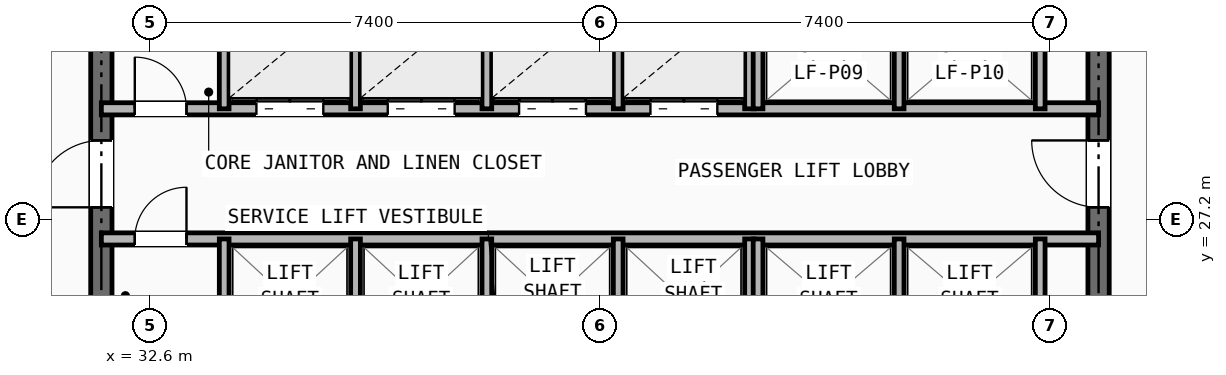
"""IFC4 building model, lengths in metres.
Left out: names, types, materials, properties, quantities, classifications, styles, units other than length and angle.
Written with IfcOpenShell. Run it as: python <this file> out.ifc"""

import sys

from ifc_helpers import new_model, si_unit, direction, frame, frame_2d, origin, place, context, subcontext, project, spatial, rectangle, extrude, element, fill, save


model = new_model("IFC4")
c1 = context("Model", 3, precision=1e-05, world=origin(), true_north=direction((0.0, 1.0)))
c2 = subcontext(c1, "Body", "Model", "MODEL_VIEW")
j1 = project(units=[si_unit("LENGTHUNIT", "METRE"), si_unit("PLANEANGLEUNIT", "RADIAN")], contexts=[c1])
p1 = place(None, origin())
s1 = spatial("IfcSite", under=j1, at=p1, CompositionType="ELEMENT")
p2 = place(p1, origin())
s2 = spatial("IfcBuilding", under=s1, at=p2, CompositionType="ELEMENT")
p3 = place(p2, frame((0.0, 0.0, 83.0)))
s3 = spatial("IfcBuildingStorey", under=s2, at=p3, CompositionType="ELEMENT", Elevation=83.0)
p4 = place(p3, frame((31.8, 16.4, 0.0), z_axis=(0.0, 0.0, 1.0), x_axis=(0.0, 1.0, 0.0)))
e1 = element("IfcWall", 1, at=p4, inside=s3, PredefinedType="SHEAR", context=c2, shape_type="SweptSolid", body=[
    extrude(rectangle(XDim=14.8, YDim=0.35, at=frame_2d((7.4, 0.0))), origin(), (0.0, 0.0, 1.0), 2.97),
])
p5 = place(p4, frame((11.0, 0.0, 0.0)))
e2 = element("IfcOpeningElement", 2, at=p5, cuts=e1, PredefinedType="OPENING", context=c2, shape_type="SweptSolid", body=[
    extrude(rectangle(XDim=1.1, YDim=2.15, at=frame_2d((0.55, 1.075))), frame((0.0, 0.185, 0.0), z_axis=(0.0, -1.0, 0.0), x_axis=(1.0, 0.0, 0.0)), (0.0, 0.0, 1.0), 0.37),
])
p6 = place(p3, frame((48.2, 16.4, 0.0), z_axis=(0.0, 0.0, 1.0), x_axis=(0.0, 1.0, 0.0)))
e3 = element("IfcWall", 3, at=p6, inside=s3, PredefinedType="SHEAR", context=c2, shape_type="SweptSolid", body=[
    extrude(rectangle(XDim=14.8, YDim=0.35, at=frame_2d((7.4, 0.0))), origin(), (0.0, 0.0, 1.0), 2.97),
])
p7 = place(p6, frame((11.0, 0.0, 0.0)))
e4 = element("IfcOpeningElement", 4, at=p7, cuts=e3, PredefinedType="OPENING", context=c2, shape_type="SweptSolid", body=[
    extrude(rectangle(XDim=1.1, YDim=2.15, at=frame_2d((0.55, 1.075))), frame((0.0, 0.185, 0.0), z_axis=(0.0, -1.0, 0.0), x_axis=(1.0, 0.0, 0.0)), (0.0, 0.0, 1.0), 0.37),
])
p8 = place(p3, frame((31.8, 29.02, 0.0), z_axis=(0.0, 0.0, 1.0), x_axis=(1.0, 0.0, 0.0)))
e5 = element("IfcWall", 5, at=p8, inside=s3, PredefinedType="SOLIDWALL", context=c2, shape_type="SweptSolid", body=[
    extrude(rectangle(XDim=16.4, YDim=0.2, at=frame_2d((8.2, 0.0))), origin(), (0.0, 0.0, 1.0), 2.421),
])
p9 = place(p8, frame((0.55, 0.0, 0.0)))
e6 = element("IfcOpeningElement", 6, at=p9, cuts=e5, PredefinedType="OPENING", context=c2, shape_type="SweptSolid", body=[
    extrude(rectangle(XDim=0.85, YDim=2.05, at=frame_2d((0.425, 1.025))), frame((0.0, 0.11, 0.0), z_axis=(0.0, -1.0, 0.0), x_axis=(1.0, 0.0, 0.0)), (0.0, 0.0, 1.0), 0.22),
])
p10 = place(p8, frame((2.55, 0.0, 0.0)))
e7 = element("IfcOpeningElement", 7, at=p10, cuts=e5, PredefinedType="OPENING", context=c2, shape_type="SweptSolid", body=[
    extrude(rectangle(XDim=1.1, YDim=2.15, at=frame_2d((0.55, 1.075))), frame((0.0, 0.11, 0.0), z_axis=(0.0, -1.0, 0.0), x_axis=(1.0, 0.0, 0.0)), (0.0, 0.0, 1.0), 0.22),
])
p11 = place(p8, frame((4.71, 0.0, 0.0)))
e8 = element("IfcOpeningElement", 8, at=p11, cuts=e5, PredefinedType="OPENING", context=c2, shape_type="SweptSolid", body=[
    extrude(rectangle(XDim=1.1, YDim=2.15, at=frame_2d((0.55, 1.075))), frame((0.0, 0.11, 0.0), z_axis=(0.0, -1.0, 0.0), x_axis=(1.0, 0.0, 0.0)), (0.0, 0.0, 1.0), 0.22),
])
p12 = place(p8, frame((6.87, 0.0, 0.0)))
e9 = element("IfcOpeningElement", 9, at=p12, cuts=e5, PredefinedType="OPENING", context=c2, shape_type="SweptSolid", body=[
    extrude(rectangle(XDim=1.1, YDim=2.15, at=frame_2d((0.55, 1.075))), frame((0.0, 0.11, 0.0), z_axis=(0.0, -1.0, 0.0), x_axis=(1.0, 0.0, 0.0)), (0.0, 0.0, 1.0), 0.22),
])
p13 = place(p8, frame((9.03, 0.0, 0.0)))
e10 = element("IfcOpeningElement", 10, at=p13, cuts=e5, PredefinedType="OPENING", context=c2, shape_type="SweptSolid", body=[
    extrude(rectangle(XDim=1.1, YDim=2.15, at=frame_2d((0.55, 1.075))), frame((0.0, 0.11, 0.0), z_axis=(0.0, -1.0, 0.0), x_axis=(1.0, 0.0, 0.0)), (0.0, 0.0, 1.0), 0.22),
])
p14 = place(p3, frame((31.8, 26.88, 0.0), z_axis=(0.0, 0.0, 1.0), x_axis=(1.0, 0.0, 0.0)))
e11 = element("IfcWall", 11, at=p14, inside=s3, PredefinedType="SOLIDWALL", context=c2, shape_type="SweptSolid", body=[
    extrude(rectangle(XDim=16.4, YDim=0.2, at=frame_2d((8.2, 0.0))), origin(), (0.0, 0.0, 1.0), 2.421),
])
p15 = place(p14, frame((0.55, 0.0, 0.0)))
e12 = element("IfcOpeningElement", 12, at=p15, cuts=e11, PredefinedType="OPENING", context=c2, shape_type="SweptSolid", body=[
    extrude(rectangle(XDim=0.85, YDim=2.05, at=frame_2d((0.425, 1.025))), frame((0.0, 0.11, 0.0), z_axis=(0.0, -1.0, 0.0), x_axis=(1.0, 0.0, 0.0)), (0.0, 0.0, 1.0), 0.22),
])
p16 = place(p3, frame((33.82, 29.02, 0.0), z_axis=(0.0, 0.0, 1.0), x_axis=(0.0, 1.0, 0.0)))
e13 = element("IfcWall", 13, at=p16, inside=s3, PredefinedType="SOLIDWALL", context=c2, shape_type="SweptSolid", body=[
    extrude(rectangle(XDim=2.18, YDim=0.16, at=frame_2d((1.09, 0.0))), origin(), (0.0, 0.0, 1.0), 2.421),
])
p17 = place(p3, frame((33.82, 24.8, 0.0), z_axis=(0.0, 0.0, 1.0), x_axis=(0.0, 1.0, 0.0)))
e14 = element("IfcWall", 14, at=p17, inside=s3, PredefinedType="SOLIDWALL", context=c2, shape_type="SweptSolid", body=[
    extrude(rectangle(XDim=2.08, YDim=0.16, at=frame_2d((1.04, 0.0))), origin(), (0.0, 0.0, 1.0), 2.97),
])
for number, where, z_axis, x_axis in (
    (15, (35.98, 29.02, 0.0), (0.0, 0.0, 1.0), (0.0, 1.0, 0.0)),
    (16, (38.14, 29.02, 0.0), (0.0, 0.0, 1.0), (0.0, 1.0, 0.0)),
    (17, (40.3, 29.02, 0.0), (0.0, 0.0, 1.0), (0.0, 1.0, 0.0)),
    (18, (42.46, 29.02, 0.0), (0.0, 0.0, 1.0), (0.0, 1.0, 0.0)),
):
    element("IfcWall", number, at=place(p3, frame(where, z_axis=z_axis, x_axis=x_axis)), inside=s3, PredefinedType="SOLIDWALL", context=c2, shape_type="SweptSolid", body=[
        extrude(rectangle(XDim=2.18, YDim=0.16, at=frame_2d((1.09, 0.0))), origin(), (0.0, 0.0, 1.0), 2.421),
    ])
for number, where, z_axis, x_axis in (
    (19, (35.98, 24.8, 0.0), (0.0, 0.0, 1.0), (0.0, 1.0, 0.0)),
    (20, (38.14, 24.8, 0.0), (0.0, 0.0, 1.0), (0.0, 1.0, 0.0)),
    (21, (40.3, 24.8, 0.0), (0.0, 0.0, 1.0), (0.0, 1.0, 0.0)),
    (22, (42.46, 24.8, 0.0), (0.0, 0.0, 1.0), (0.0, 1.0, 0.0)),
):
    element("IfcWall", number, at=place(p3, frame(where, z_axis=z_axis, x_axis=x_axis)), inside=s3, PredefinedType="SOLIDWALL", context=c2, shape_type="SweptSolid", body=[
        extrude(rectangle(XDim=2.08, YDim=0.16, at=frame_2d((1.04, 0.0))), origin(), (0.0, 0.0, 1.0), 2.97),
    ])
for number, where, z_axis, x_axis in (
    (23, (42.6, 29.02, 0.0), (0.0, 0.0, 1.0), (0.0, 1.0, 0.0)),
    (24, (44.92, 29.02, 0.0), (0.0, 0.0, 1.0), (0.0, 1.0, 0.0)),
    (25, (47.24, 29.02, 0.0), (0.0, 0.0, 1.0), (0.0, 1.0, 0.0)),
):
    element("IfcWall", number, at=place(p3, frame(where, z_axis=z_axis, x_axis=x_axis)), inside=s3, PredefinedType="SOLIDWALL", context=c2, shape_type="SweptSolid", body=[
        extrude(rectangle(XDim=2.18, YDim=0.16, at=frame_2d((1.09, 0.0))), origin(), (0.0, 0.0, 1.0), 2.421),
    ])
for number, where, z_axis, x_axis in (
    (26, (42.6, 24.8, 0.0), (0.0, 0.0, 1.0), (0.0, 1.0, 0.0)),
    (27, (44.92, 24.8, 0.0), (0.0, 0.0, 1.0), (0.0, 1.0, 0.0)),
    (28, (47.24, 24.8, 0.0), (0.0, 0.0, 1.0), (0.0, 1.0, 0.0)),
):
    element("IfcWall", number, at=place(p3, frame(where, z_axis=z_axis, x_axis=x_axis)), inside=s3, PredefinedType="SOLIDWALL", context=c2, shape_type="SweptSolid", body=[
        extrude(rectangle(XDim=2.08, YDim=0.16, at=frame_2d((1.04, 0.0))), origin(), (0.0, 0.0, 1.0), 2.97),
    ])
p18 = place(p9, origin())
e29 = element("IfcDoor", 29, at=p18, inside=s3, OperationType="SINGLE_SWING_LEFT", PredefinedType="DOOR", context=c2, shape_type="SweptSolid", body=[
    extrude(rectangle(XDim=0.85, YDim=2.05, at=frame_2d((0.425, 1.025))), frame((0.0, 0.025, 0.0), z_axis=(0.0, -1.0, 0.0), x_axis=(1.0, 0.0, 0.0)), (0.0, 0.0, 1.0), 0.05),
])
fill(e6, e29)
p19 = place(p15, origin())
e30 = element("IfcDoor", 30, at=p19, inside=s3, OperationType="SINGLE_SWING_RIGHT", PredefinedType="DOOR", context=c2, shape_type="SweptSolid", body=[
    extrude(rectangle(XDim=0.85, YDim=2.05, at=frame_2d((0.425, 1.025))), frame((0.0, 0.025, 0.0), z_axis=(0.0, -1.0, 0.0), x_axis=(1.0, 0.0, 0.0)), (0.0, 0.0, 1.0), 0.05),
])
fill(e12, e30)
p20 = place(p5, origin())
e31 = element("IfcDoor", 31, at=p20, inside=s3, OperationType="SINGLE_SWING_LEFT", PredefinedType="DOOR", context=c2, shape_type="SweptSolid", body=[
    extrude(rectangle(XDim=1.1, YDim=2.15, at=frame_2d((0.55, 1.075))), frame((0.0, 0.025, 0.0), z_axis=(0.0, -1.0, 0.0), x_axis=(1.0, 0.0, 0.0)), (0.0, 0.0, 1.0), 0.05),
])
fill(e2, e31)
p21 = place(p7, origin())
e32 = element("IfcDoor", 32, at=p21, inside=s3, OperationType="SINGLE_SWING_RIGHT", PredefinedType="DOOR", context=c2, shape_type="SweptSolid", body=[
    extrude(rectangle(XDim=1.1, YDim=2.15, at=frame_2d((0.55, 1.075))), frame((0.0, 0.025, 0.0), z_axis=(0.0, -1.0, 0.0), x_axis=(1.0, 0.0, 0.0)), (0.0, 0.0, 1.0), 0.05),
])
fill(e4, e32)
p22 = place(p10, origin())
e33 = element("IfcDoor", 33, at=p22, inside=s3, OperationType="DOUBLE_DOOR_SLIDING", PredefinedType="DOOR", context=c2, shape_type="SweptSolid", body=[
    extrude(rectangle(XDim=1.1, YDim=2.15, at=frame_2d((0.55, 1.075))), frame((0.0, 0.025, 0.0), z_axis=(0.0, -1.0, 0.0), x_axis=(1.0, 0.0, 0.0)), (0.0, 0.0, 1.0), 0.05),
])
fill(e7, e33)
p23 = place(p11, origin())
e34 = element("IfcDoor", 34, at=p23, inside=s3, OperationType="DOUBLE_DOOR_SLIDING", PredefinedType="DOOR", context=c2, shape_type="SweptSolid", body=[
    extrude(rectangle(XDim=1.1, YDim=2.15, at=frame_2d((0.55, 1.075))), frame((0.0, 0.025, 0.0), z_axis=(0.0, -1.0, 0.0), x_axis=(1.0, 0.0, 0.0)), (0.0, 0.0, 1.0), 0.05),
])
fill(e8, e34)
p24 = place(p12, origin())
e35 = element("IfcDoor", 35, at=p24, inside=s3, OperationType="DOUBLE_DOOR_SLIDING", PredefinedType="DOOR", context=c2, shape_type="SweptSolid", body=[
    extrude(rectangle(XDim=1.1, YDim=2.15, at=frame_2d((0.55, 1.075))), frame((0.0, 0.025, 0.0), z_axis=(0.0, -1.0, 0.0), x_axis=(1.0, 0.0, 0.0)), (0.0, 0.0, 1.0), 0.05),
])
fill(e9, e35)
p25 = place(p13, origin())
e36 = element("IfcDoor", 36, at=p25, inside=s3, OperationType="DOUBLE_DOOR_SLIDING", PredefinedType="DOOR", context=c2, shape_type="SweptSolid", body=[
    extrude(rectangle(XDim=1.1, YDim=2.15, at=frame_2d((0.55, 1.075))), frame((0.0, 0.025, 0.0), z_axis=(0.0, -1.0, 0.0), x_axis=(1.0, 0.0, 0.0)), (0.0, 0.0, 1.0), 0.05),
])
fill(e10, e36)
save(model, sys.argv[1])
